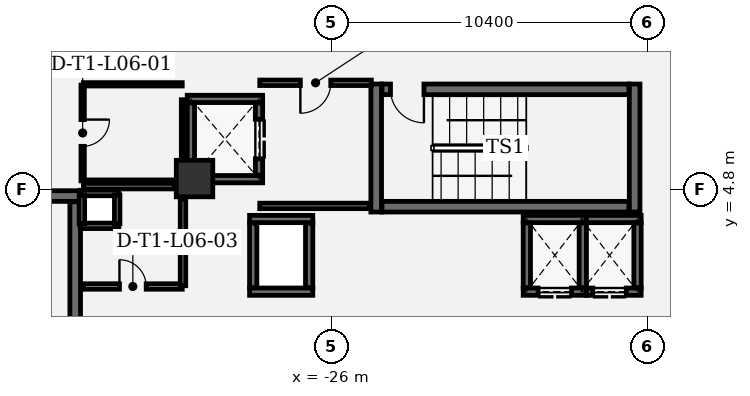
"""IFC4 building model, lengths in metres.
Left out: names, types, materials, properties, quantities, classifications, styles, units other than length and angle.
Written with IfcOpenShell. Run it as: python <this file> out.ifc"""

import sys

from ifc_helpers import new_model, si_unit, direction, frame, frame_2d, origin, origin_2d, place, context, subcontext, project, spatial, rectangle, extrude, element, fill, save


model = new_model("IFC4")
c1 = context("Model", 3, precision=1e-05, world=origin(), true_north=direction((0.0, 1.0)))
c2 = subcontext(c1, "Body", "Model", "MODEL_VIEW")
j1 = project(units=[si_unit("LENGTHUNIT", "METRE"), si_unit("PLANEANGLEUNIT", "RADIAN")], contexts=[c1])
p1 = place(None, origin())
s1 = spatial("IfcSite", under=j1, at=p1, CompositionType="ELEMENT")
p2 = place(p1, origin())
s2 = spatial("IfcBuilding", under=s1, at=p2, CompositionType="ELEMENT")
p3 = place(p2, frame((0.0, 0.0, 32.4)))
s3 = spatial("IfcBuildingStorey", under=s2, at=p3, CompositionType="ELEMENT", Elevation=32.4)
p4 = place(p3, frame((-30.5, 5.15, 0.0), z_axis=(0.0, 0.0, 1.0), x_axis=(1.0, 0.0, 0.0)))
e1 = element("IfcColumn", 1, at=p4, inside=s3, PredefinedType="COLUMN", context=c2, shape_type="SweptSolid", body=[
    extrude(rectangle(XDim=1.2, YDim=1.2, at=origin_2d()), origin(), (0.0, 0.0, 1.0), 4.2),
])
for number, where, z_axis, x_axis in (
    (2, (-24.525, 8.26, 0.0), (0.0, 0.0, 1.0), (0.0, -1.0, 0.0)),
    (3, (-16.025, 4.05, 0.0), (0.0, 0.0, 1.0), (0.0, 1.0, 0.0)),
):
    element("IfcWall", number, at=place(p3, frame(where, z_axis=z_axis, x_axis=x_axis)), inside=s3, PredefinedType="SHEAR", context=c2, shape_type="SweptSolid", body=[
        extrude(rectangle(XDim=4.21, YDim=0.35, at=frame_2d((2.105, 0.0))), origin(), (0.0, 0.0, 1.0), 3.92),
    ])
p5 = place(p3, frame((-24.335, 4.225, 0.0), z_axis=(0.0, 0.0, 1.0), x_axis=(1.0, 0.0, 0.0)))
e4 = element("IfcWall", 4, at=p5, inside=s3, PredefinedType="SHEAR", context=c2, shape_type="SweptSolid", body=[
    extrude(rectangle(XDim=8.12, YDim=0.35, at=frame_2d((4.06, 0.0))), origin(), (0.0, 0.0, 1.0), 3.92),
])
p6 = place(p3, frame((-16.215, 8.085, 0.0), z_axis=(0.0, 0.0, 1.0), x_axis=(-1.0, 0.0, 0.0)))
e5 = element("IfcWall", 5, at=p6, inside=s3, PredefinedType="SHEAR", context=c2, shape_type="SweptSolid", body=[
    extrude(rectangle(XDim=8.12, YDim=0.35, at=frame_2d((4.06, 0.0))), origin(), (0.0, 0.0, 1.0), 3.92),
])
p7 = place(p6, frame((6.74, 0.0, 0.0)))
e6 = element("IfcOpeningElement", 6, at=p7, cuts=e5, PredefinedType="OPENING", context=c2, shape_type="SweptSolid", body=[
    extrude(rectangle(XDim=1.1, YDim=2.2, at=frame_2d((0.55, 1.1))), frame((0.0, 0.185, 0.0), z_axis=(0.0, -1.0, 0.0), x_axis=(1.0, 0.0, 0.0)), (0.0, 0.0, 1.0), 0.37),
])
p8 = place(p3, frame((-34.25, 4.575, 0.0), z_axis=(0.0, 0.0, 1.0), x_axis=(-1.0, 0.0, 0.0)))
e7 = element("IfcWall", 7, at=p8, inside=s3, PredefinedType="SHEAR", context=c2, shape_type="SweptSolid", body=[
    extrude(rectangle(XDim=4.21, YDim=0.35, at=frame_2d((2.105, 0.0))), origin(), (0.0, 0.0, 1.0), 3.92),
])
p9 = place(p3, frame((-34.425, -4.385, 0.0), z_axis=(0.0, 0.0, 1.0), x_axis=(0.0, 1.0, 0.0)))
e8 = element("IfcWall", 8, at=p9, inside=s3, PredefinedType="SHEAR", context=c2, shape_type="SweptSolid", body=[
    extrude(rectangle(XDim=8.77, YDim=0.35, at=frame_2d((4.385, 0.0))), origin(), (0.0, 0.0, 1.0), 3.92),
])
for number, where, z_axis, x_axis in (
    (9, (-28.26, 5.13, 0.0), (0.0, 0.0, 1.0), (-1.0, 0.0, 0.0)),
    (10, (-30.74, 7.77, 0.0), (0.0, 0.0, 1.0), (1.0, 0.0, 0.0)),
):
    element("IfcWall", number, at=place(p3, frame(where, z_axis=z_axis, x_axis=x_axis)), inside=s3, PredefinedType="SHEAR", context=c2, shape_type="SweptSolid", body=[
        extrude(rectangle(XDim=2.48, YDim=0.24, at=frame_2d((1.24, 0.0))), origin(), (0.0, 0.0, 1.0), 3.92),
    ])
p10 = place(p3, frame((-30.62, 5.262, 0.0), z_axis=(0.0, 0.0, 1.0), x_axis=(0.0, 1.0, 0.0)))
e11 = element("IfcWall", 11, at=p10, inside=s3, PredefinedType="SHEAR", context=c2, shape_type="SweptSolid", body=[
    extrude(rectangle(XDim=2.376, YDim=0.24, at=frame_2d((1.188, 0.0))), origin(), (0.0, 0.0, 1.0), 3.92),
])
p11 = place(p3, frame((-28.38, 7.638, 0.0), z_axis=(0.0, 0.0, 1.0), x_axis=(0.0, -1.0, 0.0)))
e12 = element("IfcWall", 12, at=p11, inside=s3, PredefinedType="SHEAR", context=c2, shape_type="SweptSolid", body=[
    extrude(rectangle(XDim=2.376, YDim=0.24, at=frame_2d((1.188, 0.0))), origin(), (0.0, 0.0, 1.0), 3.92),
])
p12 = place(p11, frame((0.538, 0.0, 0.0)))
e13 = element("IfcOpeningElement", 13, at=p12, cuts=e12, PredefinedType="OPENING", context=c2, shape_type="SweptSolid", body=[
    extrude(rectangle(XDim=1.3, YDim=2.3, at=frame_2d((0.65, 1.15))), frame((0.0, 0.13, 0.0), z_axis=(0.0, -1.0, 0.0), x_axis=(1.0, 0.0, 0.0)), (0.0, 0.0, 1.0), 0.26),
])
for number, where, z_axis, x_axis in (
    (14, (-26.61, 1.43, 0.0), (0.0, 0.0, 1.0), (-1.0, 0.0, 0.0)),
    (15, (-28.69, 3.82, 0.0), (0.0, 0.0, 1.0), (1.0, 0.0, 0.0)),
):
    element("IfcWall", number, at=place(p3, frame(where, z_axis=z_axis, x_axis=x_axis)), inside=s3, PredefinedType="SHEAR", context=c2, shape_type="SweptSolid", body=[
        extrude(rectangle(XDim=2.08, YDim=0.24, at=frame_2d((1.04, 0.0))), origin(), (0.0, 0.0, 1.0), 3.92),
    ])
for number, where, z_axis, x_axis in (
    (16, (-28.57, 1.562, 0.0), (0.0, 0.0, 1.0), (0.0, 1.0, 0.0)),
    (17, (-26.73, 3.688, 0.0), (0.0, 0.0, 1.0), (0.0, -1.0, 0.0)),
):
    element("IfcWall", number, at=place(p3, frame(where, z_axis=z_axis, x_axis=x_axis)), inside=s3, PredefinedType="SHEAR", context=c2, shape_type="SweptSolid", body=[
        extrude(rectangle(XDim=2.126, YDim=0.24, at=frame_2d((1.063, 0.0))), origin(), (0.0, 0.0, 1.0), 3.92),
    ])
p13 = place(p3, frame((-17.61, 1.43, 0.0), z_axis=(0.0, 0.0, 1.0), x_axis=(-1.0, 0.0, 0.0)))
e18 = element("IfcWall", 18, at=p13, inside=s3, PredefinedType="SHEAR", context=c2, shape_type="SweptSolid", body=[
    extrude(rectangle(XDim=2.08, YDim=0.24, at=frame_2d((1.04, 0.0))), origin(), (0.0, 0.0, 1.0), 3.92),
])
p14 = place(p13, frame((0.49, 0.0, 0.0)))
e19 = element("IfcOpeningElement", 19, at=p14, cuts=e18, PredefinedType="OPENING", context=c2, shape_type="SweptSolid", body=[
    extrude(rectangle(XDim=1.1, YDim=2.2, at=frame_2d((0.55, 1.1))), frame((0.0, 0.13, 0.0), z_axis=(0.0, -1.0, 0.0), x_axis=(1.0, 0.0, 0.0)), (0.0, 0.0, 1.0), 0.26),
])
p15 = place(p3, frame((-19.69, 3.82, 0.0), z_axis=(0.0, 0.0, 1.0), x_axis=(1.0, 0.0, 0.0)))
e20 = element("IfcWall", 20, at=p15, inside=s3, PredefinedType="SHEAR", context=c2, shape_type="SweptSolid", body=[
    extrude(rectangle(XDim=2.08, YDim=0.24, at=frame_2d((1.04, 0.0))), origin(), (0.0, 0.0, 1.0), 3.92),
])
for number, where, z_axis, x_axis in (
    (21, (-19.57, 1.562, 0.0), (0.0, 0.0, 1.0), (0.0, 1.0, 0.0)),
    (22, (-17.73, 3.688, 0.0), (0.0, 0.0, 1.0), (0.0, -1.0, 0.0)),
):
    element("IfcWall", number, at=place(p3, frame(where, z_axis=z_axis, x_axis=x_axis)), inside=s3, PredefinedType="SHEAR", context=c2, shape_type="SweptSolid", body=[
        extrude(rectangle(XDim=2.126, YDim=0.24, at=frame_2d((1.063, 0.0))), origin(), (0.0, 0.0, 1.0), 3.92),
    ])
p16 = place(p3, frame((-15.81, 1.43, 0.0), z_axis=(0.0, 0.0, 1.0), x_axis=(-1.0, 0.0, 0.0)))
e23 = element("IfcWall", 23, at=p16, inside=s3, PredefinedType="SHEAR", context=c2, shape_type="SweptSolid", body=[
    extrude(rectangle(XDim=1.8, YDim=0.24, at=frame_2d((0.9, 0.0))), origin(), (0.0, 0.0, 1.0), 3.92),
])
p17 = place(p16, frame((0.49, 0.0, 0.0)))
e24 = element("IfcOpeningElement", 24, at=p17, cuts=e23, PredefinedType="OPENING", context=c2, shape_type="SweptSolid", body=[
    extrude(rectangle(XDim=1.1, YDim=2.2, at=frame_2d((0.55, 1.1))), frame((0.0, 0.13, 0.0), z_axis=(0.0, -1.0, 0.0), x_axis=(1.0, 0.0, 0.0)), (0.0, 0.0, 1.0), 0.26),
])
p18 = place(p3, frame((-17.61, 3.82, 0.0), z_axis=(0.0, 0.0, 1.0), x_axis=(1.0, 0.0, 0.0)))
e25 = element("IfcWall", 25, at=p18, inside=s3, PredefinedType="SHEAR", context=c2, shape_type="SweptSolid", body=[
    extrude(rectangle(XDim=1.8, YDim=0.24, at=frame_2d((0.9, 0.0))), origin(), (0.0, 0.0, 1.0), 3.92),
])
p19 = place(p3, frame((-15.93, 3.688, 0.0), z_axis=(0.0, 0.0, 1.0), x_axis=(0.0, -1.0, 0.0)))
e26 = element("IfcWall", 26, at=p19, inside=s3, PredefinedType="SHEAR", context=c2, shape_type="SweptSolid", body=[
    extrude(rectangle(XDim=2.126, YDim=0.24, at=frame_2d((1.063, 0.0))), origin(), (0.0, 0.0, 1.0), 3.92),
])
for number, where, z_axis, x_axis in (
    (27, (-32.99, 3.595, 0.0), (0.0, 0.0, 1.0), (-1.0, 0.0, 0.0)),
    (28, (-34.26, 4.675, 0.0), (0.0, 0.0, 1.0), (1.0, 0.0, 0.0)),
):
    element("IfcWall", number, at=place(p3, frame(where, z_axis=z_axis, x_axis=x_axis)), inside=s3, PredefinedType="PARTITIONING", context=c2, shape_type="SweptSolid", body=[
        extrude(rectangle(XDim=1.27, YDim=0.18, at=frame_2d((0.635, 0.0))), origin(), (0.0, 0.0, 1.0), 3.92),
    ])
for number, where, z_axis, x_axis in (
    (29, (-34.205, 3.66, 0.0), (0.0, 0.0, 1.0), (0.0, 1.0, 0.0)),
    (30, (-33.045, 4.61, 0.0), (0.0, 0.0, 1.0), (0.0, -1.0, 0.0)),
):
    element("IfcWall", number, at=place(p3, frame(where, z_axis=z_axis, x_axis=x_axis)), inside=s3, PredefinedType="PARTITIONING", context=c2, shape_type="SweptSolid", body=[
        extrude(rectangle(XDim=0.95, YDim=0.18, at=frame_2d((0.475, 0.0))), origin(), (0.0, 0.0, 1.0), 3.92),
    ])
p20 = place(p3, frame((-28.355, 4.25, 0.0), z_axis=(0.0, 0.0, 1.0), x_axis=(1.0, 0.0, 0.0)))
e31 = element("IfcWall", 31, at=p20, inside=s3, PredefinedType="PARTITIONING", context=c2, shape_type="SweptSolid", body=[
    extrude(rectangle(XDim=3.622, YDim=0.18, at=frame_2d((1.811, 0.0))), origin(), (0.0, 0.0, 1.0), 3.92),
])
p21 = place(p3, frame((-24.684, 8.3, 0.0), z_axis=(0.0, 0.0, 1.0), x_axis=(-1.0, 0.0, 0.0)))
e32 = element("IfcWall", 32, at=p21, inside=s3, PredefinedType="PARTITIONING", context=c2, shape_type="SweptSolid", body=[
    extrude(rectangle(XDim=3.671, YDim=0.18, at=frame_2d((1.835, 0.0))), origin(), (0.0, 0.0, 1.0), 3.92),
])
p22 = place(p21, frame((1.335, 0.0, 0.0)))
e33 = element("IfcOpeningElement", 33, at=p22, cuts=e32, PredefinedType="OPENING", context=c2, shape_type="SweptSolid", body=[
    extrude(rectangle(XDim=1.0, YDim=2.15, at=frame_2d((0.5, 1.075))), frame((0.0, 0.1, 0.0), z_axis=(0.0, -1.0, 0.0), x_axis=(1.0, 0.0, 0.0)), (0.0, 0.0, 1.0), 0.2),
])
p23 = place(p3, frame((-34.18, 8.225, 0.0), z_axis=(0.0, 0.0, 1.0), x_axis=(0.0, -1.0, 0.0)))
e34 = element("IfcWall", 34, at=p23, inside=s3, PredefinedType="PARTITIONING", context=c2, shape_type="SweptSolid", body=[
    extrude(rectangle(XDim=3.15, YDim=0.11, at=frame_2d((1.575, 0.0))), origin(), (0.0, 0.0, 1.0), 3.92),
])
p24 = place(p23, frame((1.135, 0.0, 0.0)))
e35 = element("IfcOpeningElement", 35, at=p24, cuts=e34, PredefinedType="OPENING", context=c2, shape_type="SweptSolid", body=[
    extrude(rectangle(XDim=0.88, YDim=2.1, at=frame_2d((0.44, 1.05))), frame((0.0, 0.065, 0.0), z_axis=(0.0, -1.0, 0.0), x_axis=(1.0, 0.0, 0.0)), (0.0, 0.0, 1.0), 0.13),
])
p25 = place(p3, frame((-34.155, 5.05, 0.0), z_axis=(0.0, 0.0, 1.0), x_axis=(1.0, 0.0, 0.0)))
e36 = element("IfcWall", 36, at=p25, inside=s3, PredefinedType="PARTITIONING", context=c2, shape_type="SweptSolid", body=[
    extrude(rectangle(XDim=2.99, YDim=0.11, at=frame_2d((1.495, 0.0))), origin(), (0.0, 0.0, 1.0), 3.92),
])
p26 = place(p3, frame((-30.88, 5.815, 0.0), z_axis=(0.0, 0.0, 1.0), x_axis=(0.0, 1.0, 0.0)))
e37 = element("IfcWall", 37, at=p26, inside=s3, PredefinedType="PARTITIONING", context=c2, shape_type="SweptSolid", body=[
    extrude(rectangle(XDim=1.928, YDim=0.11, at=frame_2d((0.964, 0.0))), origin(), (0.0, 0.0, 1.0), 3.92),
])
p27 = place(p3, frame((-30.905, 8.25, 0.0), z_axis=(0.0, 0.0, 1.0), x_axis=(-1.0, 0.0, 0.0)))
e38 = element("IfcWall", 38, at=p27, inside=s3, PredefinedType="PARTITIONING", context=c2, shape_type="SweptSolid", body=[
    extrude(rectangle(XDim=3.25, YDim=0.11, at=frame_2d((1.625, 0.0))), origin(), (0.0, 0.0, 1.0), 3.92),
])
p28 = place(p3, frame((-34.155, 1.6, 0.0), z_axis=(0.0, 0.0, 1.0), x_axis=(1.0, 0.0, 0.0)))
e39 = element("IfcWall", 39, at=p28, inside=s3, PredefinedType="PARTITIONING", context=c2, shape_type="SweptSolid", body=[
    extrude(rectangle(XDim=3.25, YDim=0.18, at=frame_2d((1.625, 0.0))), origin(), (0.0, 0.0, 1.0), 3.92),
])
p29 = place(p28, frame((1.185, 0.0, 0.0)))
e40 = element("IfcOpeningElement", 40, at=p29, cuts=e39, PredefinedType="OPENING", context=c2, shape_type="SweptSolid", body=[
    extrude(rectangle(XDim=0.88, YDim=2.1, at=frame_2d((0.44, 1.05))), frame((0.0, 0.1, 0.0), z_axis=(0.0, -1.0, 0.0), x_axis=(1.0, 0.0, 0.0)), (0.0, 0.0, 1.0), 0.2),
])
p30 = place(p3, frame((-30.88, 1.625, 0.0), z_axis=(0.0, 0.0, 1.0), x_axis=(0.0, 1.0, 0.0)))
e41 = element("IfcWall", 41, at=p30, inside=s3, PredefinedType="PARTITIONING", context=c2, shape_type="SweptSolid", body=[
    extrude(rectangle(XDim=2.86, YDim=0.18, at=frame_2d((1.43, 0.0))), origin(), (0.0, 0.0, 1.0), 3.92),
])
p31 = place(p3, frame((-31.165, 4.9, 0.0), z_axis=(0.0, 0.0, 1.0), x_axis=(-1.0, 0.0, 0.0)))
e42 = element("IfcWall", 42, at=p31, inside=s3, PredefinedType="PARTITIONING", context=c2, shape_type="SweptSolid", body=[
    extrude(rectangle(XDim=2.99, YDim=0.18, at=frame_2d((1.495, 0.0))), origin(), (0.0, 0.0, 1.0), 3.92),
])
p32 = place(p7, origin())
e43 = element("IfcDoor", 43, at=p32, inside=s3, OperationType="SINGLE_SWING_LEFT", PredefinedType="DOOR", context=c2, shape_type="SweptSolid", body=[
    extrude(rectangle(XDim=1.1, YDim=2.2, at=frame_2d((0.55, 1.1))), frame((0.0, 0.025, 0.0), z_axis=(0.0, -1.0, 0.0), x_axis=(1.0, 0.0, 0.0)), (0.0, 0.0, 1.0), 0.05),
])
fill(e6, e43)
p33 = place(p12, origin())
e44 = element("IfcDoor", 44, at=p33, inside=s3, OperationType="DOUBLE_DOOR_SLIDING", PredefinedType="DOOR", context=c2, shape_type="SweptSolid", body=[
    extrude(rectangle(XDim=1.3, YDim=2.3, at=frame_2d((0.65, 1.15))), frame((0.0, 0.025, 0.0), z_axis=(0.0, -1.0, 0.0), x_axis=(1.0, 0.0, 0.0)), (0.0, 0.0, 1.0), 0.05),
])
fill(e13, e44)
p34 = place(p14, origin())
e45 = element("IfcDoor", 45, at=p34, inside=s3, OperationType="DOUBLE_DOOR_SLIDING", PredefinedType="DOOR", context=c2, shape_type="SweptSolid", body=[
    extrude(rectangle(XDim=1.1, YDim=2.2, at=frame_2d((0.55, 1.1))), frame((0.0, 0.025, 0.0), z_axis=(0.0, -1.0, 0.0), x_axis=(1.0, 0.0, 0.0)), (0.0, 0.0, 1.0), 0.05),
])
fill(e19, e45)
p35 = place(p17, origin())
e46 = element("IfcDoor", 46, at=p35, inside=s3, OperationType="DOUBLE_DOOR_SLIDING", PredefinedType="DOOR", context=c2, shape_type="SweptSolid", body=[
    extrude(rectangle(XDim=1.1, YDim=2.2, at=frame_2d((0.55, 1.1))), frame((0.0, 0.025, 0.0), z_axis=(0.0, -1.0, 0.0), x_axis=(1.0, 0.0, 0.0)), (0.0, 0.0, 1.0), 0.05),
])
fill(e24, e46)
p36 = place(p24, origin())
e47 = element("IfcDoor", 47, at=p36, inside=s3, OperationType="SINGLE_SWING_LEFT", PredefinedType="DOOR", context=c2, shape_type="SweptSolid", body=[
    extrude(rectangle(XDim=0.88, YDim=2.1, at=frame_2d((0.44, 1.05))), frame((0.0, 0.025, 0.0), z_axis=(0.0, -1.0, 0.0), x_axis=(1.0, 0.0, 0.0)), (0.0, 0.0, 1.0), 0.05),
])
fill(e35, e47)
p37 = place(p29, origin())
e48 = element("IfcDoor", 48, at=p37, inside=s3, OperationType="SINGLE_SWING_LEFT", PredefinedType="DOOR", context=c2, shape_type="SweptSolid", body=[
    extrude(rectangle(XDim=0.88, YDim=2.1, at=frame_2d((0.44, 1.05))), frame((0.0, 0.025, 0.0), z_axis=(0.0, -1.0, 0.0), x_axis=(1.0, 0.0, 0.0)), (0.0, 0.0, 1.0), 0.05),
])
fill(e40, e48)
p38 = place(p22, origin())
e49 = element("IfcDoor", 49, at=p38, inside=s3, OperationType="SINGLE_SWING_RIGHT", PredefinedType="DOOR", context=c2, shape_type="SweptSolid", body=[
    extrude(rectangle(XDim=1.0, YDim=2.15, at=frame_2d((0.5, 1.075))), frame((0.0, 0.025, 0.0), z_axis=(0.0, -1.0, 0.0), x_axis=(1.0, 0.0, 0.0)), (0.0, 0.0, 1.0), 0.05),
])
fill(e33, e49)
save(model, sys.argv[1])
